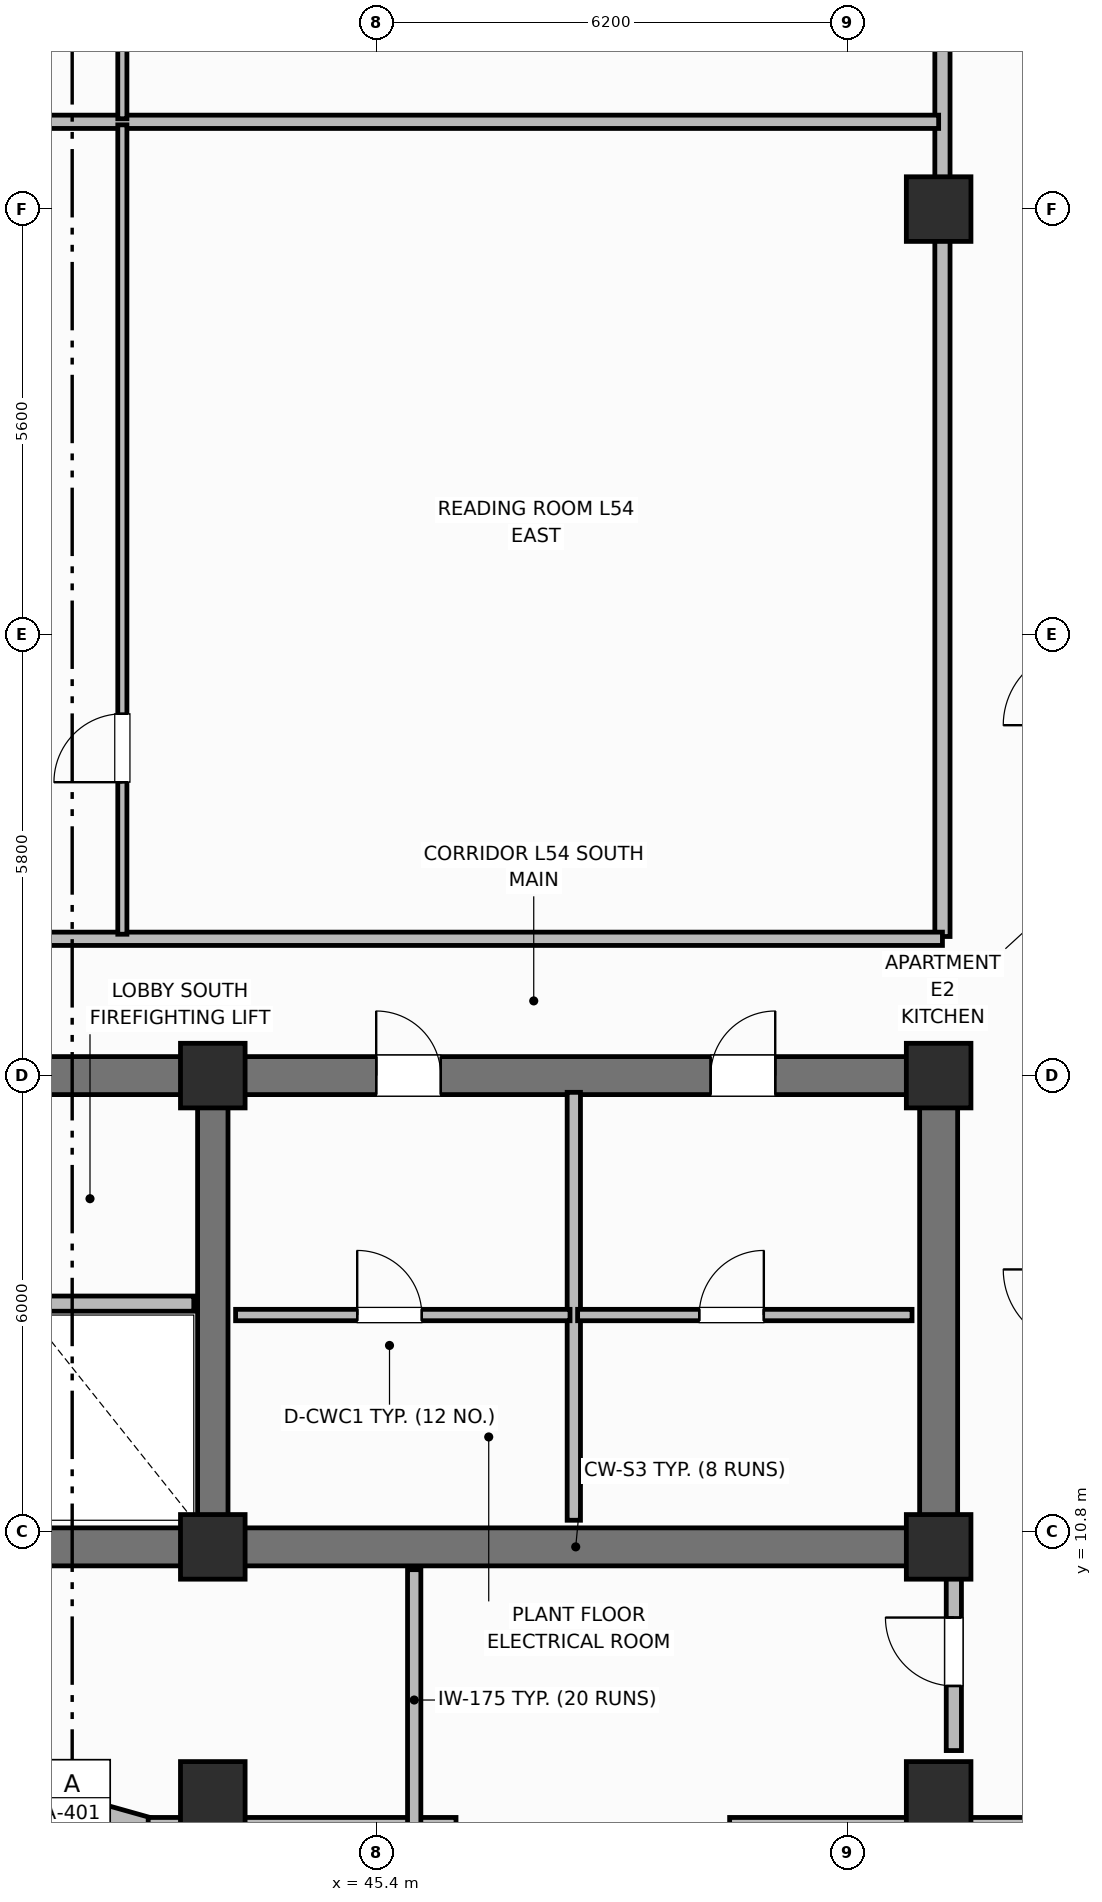
"""IFC4 building model, lengths in metres.
Left out: names, types, materials, properties, quantities, classifications, styles, units other than length and angle.
Written with IfcOpenShell. Run it as: python <this file> out.ifc"""

import sys

from ifc_helpers import new_model, si_unit, direction, frame, frame_2d, origin, origin_2d, place, context, subcontext, project, spatial, rectangle, extrude, element, fill, save


model = new_model("IFC4")
c1 = context("Model", 3, precision=1e-05, world=origin(), true_north=direction((0.0, 1.0)))
c2 = subcontext(c1, "Body", "Model", "MODEL_VIEW")
j1 = project(units=[si_unit("LENGTHUNIT", "METRE"), si_unit("PLANEANGLEUNIT", "RADIAN")], contexts=[c1])
p1 = place(None, origin())
s1 = spatial("IfcSite", under=j1, at=p1, CompositionType="ELEMENT")
p2 = place(p1, origin())
s2 = spatial("IfcBuilding", under=s1, at=p2, CompositionType="ELEMENT")
p3 = place(p2, frame((0.0, 0.0, 218.4)))
s3 = spatial("IfcBuildingStorey", under=s2, at=p3, CompositionType="ELEMENT", Elevation=218.4)
p4 = place(p3, frame((52.8, 10.6, 0.0), z_axis=(0.0, 0.0, 1.0), x_axis=(-1.0, 0.0, 0.0)))
e1 = element("IfcWall", 1, at=p4, inside=s3, PredefinedType="SHEAR", context=c2, shape_type="SweptSolid", body=[
    extrude(rectangle(XDim=27.2, YDim=0.5, at=frame_2d((13.6, 0.0))), origin(), (0.0, 0.0, 1.0), 3.7),
])
p5 = place(p3, frame((52.8, 10.85, 0.0), z_axis=(0.0, 0.0, 1.0), x_axis=(0.0, 1.0, 0.0)))
e2 = element("IfcWall", 2, at=p5, inside=s3, PredefinedType="SHEAR", context=c2, shape_type="SweptSolid", body=[
    extrude(rectangle(XDim=5.7, YDim=0.5, at=frame_2d((2.85, 0.0))), origin(), (0.0, 0.0, 1.0), 3.7),
])
p6 = place(p3, frame((25.6, 16.8, 0.0), z_axis=(0.0, 0.0, 1.0), x_axis=(1.0, 0.0, 0.0)))
e3 = element("IfcWall", 3, at=p6, inside=s3, PredefinedType="SHEAR", context=c2, shape_type="SweptSolid", body=[
    extrude(rectangle(XDim=27.2, YDim=0.5, at=frame_2d((13.6, 0.0))), origin(), (0.0, 0.0, 1.0), 3.7),
])
p7 = place(p6, frame((1.7, 0.0, 0.0)))
e4 = element("IfcOpeningElement", 4, at=p7, cuts=e3, PredefinedType="OPENING", context=c2, shape_type="SweptSolid", body=[
    extrude(rectangle(XDim=1.1, YDim=2.15, at=frame_2d((0.55, 1.075))), frame((0.0, 0.26, 0.0), z_axis=(0.0, -1.0, 0.0), x_axis=(1.0, 0.0, 0.0)), (0.0, 0.0, 1.0), 0.52),
])
p8 = place(p6, frame((4.45, 0.0, 0.0)))
e5 = element("IfcOpeningElement", 5, at=p8, cuts=e3, PredefinedType="OPENING", context=c2, shape_type="SweptSolid", body=[
    extrude(rectangle(XDim=0.85, YDim=2.1, at=frame_2d((0.425, 1.05))), frame((0.0, 0.26, 0.0), z_axis=(0.0, -1.0, 0.0), x_axis=(1.0, 0.0, 0.0)), (0.0, 0.0, 1.0), 0.52),
])
p9 = place(p6, frame((6.5, 0.0, 0.0)))
e6 = element("IfcOpeningElement", 6, at=p9, cuts=e3, PredefinedType="OPENING", context=c2, shape_type="SweptSolid", body=[
    extrude(rectangle(XDim=0.85, YDim=2.1, at=frame_2d((0.425, 1.05))), frame((0.0, 0.26, 0.0), z_axis=(0.0, -1.0, 0.0), x_axis=(1.0, 0.0, 0.0)), (0.0, 0.0, 1.0), 0.52),
])
p10 = place(p6, frame((13.0, 0.0, 0.0)))
e7 = element("IfcOpeningElement", 7, at=p10, cuts=e3, PredefinedType="OPENING", context=c2, shape_type="SweptSolid", body=[
    extrude(rectangle(XDim=1.2, YDim=2.15, at=frame_2d((0.6, 1.075))), frame((0.0, 0.26, 0.0), z_axis=(0.0, -1.0, 0.0), x_axis=(1.0, 0.0, 0.0)), (0.0, 0.0, 1.0), 0.52),
])
p11 = place(p6, frame((19.8, 0.0, 0.0)))
e8 = element("IfcOpeningElement", 8, at=p11, cuts=e3, PredefinedType="OPENING", context=c2, shape_type="SweptSolid", body=[
    extrude(rectangle(XDim=0.85, YDim=2.1, at=frame_2d((0.425, 1.05))), frame((0.0, 0.26, 0.0), z_axis=(0.0, -1.0, 0.0), x_axis=(1.0, 0.0, 0.0)), (0.0, 0.0, 1.0), 0.52),
])
p12 = place(p6, frame((24.2, 0.0, 0.0)))
e9 = element("IfcOpeningElement", 9, at=p12, cuts=e3, PredefinedType="OPENING", context=c2, shape_type="SweptSolid", body=[
    extrude(rectangle(XDim=0.85, YDim=2.1, at=frame_2d((0.425, 1.05))), frame((0.0, 0.26, 0.0), z_axis=(0.0, -1.0, 0.0), x_axis=(1.0, 0.0, 0.0)), (0.0, 0.0, 1.0), 0.52),
])
p13 = place(p3, frame((43.25, 10.85, 0.0), z_axis=(0.0, 0.0, 1.0), x_axis=(0.0, 1.0, 0.0)))
e10 = element("IfcWall", 10, at=p13, inside=s3, PredefinedType="SHEAR", context=c2, shape_type="SweptSolid", body=[
    extrude(rectangle(XDim=5.7, YDim=0.4, at=frame_2d((2.85, 0.0))), origin(), (0.0, 0.0, 1.0), 3.7),
])
for number, where, z_axis, x_axis in (
    (11, (43.25, 10.6, 0.0), (0.0, 0.0, 1.0), (1.0, 0.0, 0.0)),
    (12, (43.25, 16.8, 0.0), (0.0, 0.0, 1.0), (1.0, 0.0, 0.0)),
    (13, (52.8, 10.6, 0.0), (0.0, 0.0, 1.0), (1.0, 0.0, 0.0)),
    (14, (52.8, 16.8, 0.0), (0.0, 0.0, 1.0), (1.0, 0.0, 0.0)),
    (15, (52.8, 28.2, 0.0), (0.0, 0.0, 1.0), (1.0, 0.0, 0.0)),
    (16, (43.25, 7.35, 0.0), (0.0, 0.0, 1.0), (1.0, 0.0, 0.0)),
    (17, (52.8, 7.35, 0.0), (0.0, 0.0, 1.0), (1.0, 0.0, 0.0)),
):
    element("IfcColumn", number, at=place(p3, frame(where, z_axis=z_axis, x_axis=x_axis)), inside=s3, PredefinedType="COLUMN", context=c2, shape_type="SweptSolid", body=[
        extrude(rectangle(XDim=0.85, YDim=0.85, at=origin_2d()), origin(), (0.0, 0.0, 1.0), 3.7),
    ])
p14 = place(p3, frame((40.8, 7.32, 0.0), z_axis=(0.0, 0.0, 1.0), x_axis=(0.962652136636, -0.270741322725, 0.0)))
e18 = element("IfcWall", 18, at=p14, inside=s3, PredefinedType="SOLIDWALL", context=c2, shape_type="SweptSolid", body=[
    extrude(rectangle(XDim=1.662, YDim=0.34, at=frame_2d((0.831, 0.0))), origin(), (0.0, 0.0, 1.0), 2.72),
])
p15 = place(p3, frame((42.4, 6.87, 0.0), z_axis=(0.0, 0.0, 1.0), x_axis=(1.0, 0.0, 0.0)))
e19 = element("IfcWall", 19, at=p15, inside=s3, PredefinedType="SOLIDWALL", context=c2, shape_type="SweptSolid", body=[
    extrude(rectangle(XDim=4.05, YDim=0.34, at=frame_2d((2.025, 0.0))), origin(), (0.0, 0.0, 1.0), 2.72),
])
p16 = place(p3, frame((50.05, 6.87, 0.0), z_axis=(0.0, 0.0, 1.0), x_axis=(1.0, 0.0, 0.0)))
e20 = element("IfcWall", 20, at=p16, inside=s3, PredefinedType="SOLIDWALL", context=c2, shape_type="SweptSolid", body=[
    extrude(rectangle(XDim=8.15, YDim=0.34, at=frame_2d((4.075, 0.0))), origin(), (0.0, 0.0, 1.0), 2.72),
])
p17 = place(p3, frame((35.4, 13.8, 0.0), z_axis=(0.0, 0.0, 1.0), x_axis=(1.0, 0.0, 0.0)))
e21 = element("IfcWall", 21, at=p17, inside=s3, PredefinedType="PARTITIONING", context=c2, shape_type="SweptSolid", body=[
    extrude(rectangle(XDim=7.6, YDim=0.2, at=frame_2d((3.8, 0.0))), origin(), (0.0, 0.0, 1.0), 2.32),
])
p18 = place(p17, frame((0.7, 0.0, 0.0)))
e22 = element("IfcOpeningElement", 22, at=p18, cuts=e21, PredefinedType="OPENING", context=c2, shape_type="SweptSolid", body=[
    extrude(rectangle(XDim=1.1, YDim=2.15, at=frame_2d((0.55, 1.075))), frame((0.0, 0.11, 0.0), z_axis=(0.0, -1.0, 0.0), x_axis=(1.0, 0.0, 0.0)), (0.0, 0.0, 1.0), 0.22),
])
p19 = place(p17, frame((3.35, 0.0, 0.0)))
e23 = element("IfcOpeningElement", 23, at=p19, cuts=e21, PredefinedType="OPENING", context=c2, shape_type="SweptSolid", body=[
    extrude(rectangle(XDim=1.2, YDim=2.15, at=frame_2d((0.6, 1.075))), frame((0.0, 0.11, 0.0), z_axis=(0.0, -1.0, 0.0), x_axis=(1.0, 0.0, 0.0)), (0.0, 0.0, 1.0), 0.22),
])
p20 = place(p3, frame((48.0, 10.95, 0.0), z_axis=(0.0, 0.0, 1.0), x_axis=(0.0, 1.0, 0.0)))
e24 = element("IfcWall", 24, at=p20, inside=s3, PredefinedType="PARTITIONING", context=c2, shape_type="SweptSolid", body=[
    extrude(rectangle(XDim=5.63, YDim=0.175, at=frame_2d((2.815, 0.0))), origin(), (0.0, 0.0, 1.0), 2.55),
])
p21 = place(p3, frame((43.55, 13.65, 0.0), z_axis=(0.0, 0.0, 1.0), x_axis=(1.0, 0.0, 0.0)))
e25 = element("IfcWall", 25, at=p21, inside=s3, PredefinedType="PARTITIONING", context=c2, shape_type="SweptSolid", body=[
    extrude(rectangle(XDim=4.4, YDim=0.15, at=frame_2d((2.2, 0.0))), origin(), (0.0, 0.0, 1.0), 2.55),
])
p22 = place(p21, frame((1.6, 0.0, 0.0)))
e26 = element("IfcOpeningElement", 26, at=p22, cuts=e25, PredefinedType="OPENING", context=c2, shape_type="SweptSolid", body=[
    extrude(rectangle(XDim=0.85, YDim=2.1, at=frame_2d((0.425, 1.05))), frame((0.0, 0.085, 0.0), z_axis=(0.0, -1.0, 0.0), x_axis=(1.0, 0.0, 0.0)), (0.0, 0.0, 1.0), 0.17),
])
p23 = place(p3, frame((48.05, 13.65, 0.0), z_axis=(0.0, 0.0, 1.0), x_axis=(1.0, 0.0, 0.0)))
e27 = element("IfcWall", 27, at=p23, inside=s3, PredefinedType="PARTITIONING", context=c2, shape_type="SweptSolid", body=[
    extrude(rectangle(XDim=4.4, YDim=0.15, at=frame_2d((2.2, 0.0))), origin(), (0.0, 0.0, 1.0), 2.55),
])
p24 = place(p23, frame((1.6, 0.0, 0.0)))
e28 = element("IfcOpeningElement", 28, at=p24, cuts=e27, PredefinedType="OPENING", context=c2, shape_type="SweptSolid", body=[
    extrude(rectangle(XDim=0.85, YDim=2.1, at=frame_2d((0.425, 1.05))), frame((0.0, 0.085, 0.0), z_axis=(0.0, -1.0, 0.0), x_axis=(1.0, 0.0, 0.0)), (0.0, 0.0, 1.0), 0.17),
])
p25 = place(p3, frame((52.85, 18.63, 0.0), z_axis=(0.0, 0.0, 1.0), x_axis=(0.0, 1.0, 0.0)))
e29 = element("IfcWall", 29, at=p25, inside=s3, PredefinedType="PARTITIONING", context=c2, shape_type="SweptSolid", body=[
    extrude(rectangle(XDim=19.14, YDim=0.2, at=frame_2d((9.57, 0.0))), origin(), (0.0, 0.0, 1.0), 2.55),
])
p26 = place(p3, frame((31.35, 18.6, 0.0), z_axis=(0.0, 0.0, 1.0), x_axis=(1.0, 0.0, 0.0)))
e30 = element("IfcWall", 30, at=p26, inside=s3, PredefinedType="PARTITIONING", context=c2, shape_type="SweptSolid", body=[
    extrude(rectangle(XDim=21.5, YDim=0.175, at=frame_2d((10.75, 0.0))), origin(), (0.0, 0.0, 1.0), 2.55),
])
p27 = place(p3, frame((31.38, 29.348, 0.0), z_axis=(0.0, 0.0, 1.0), x_axis=(1.0, 0.0, 0.0)))
e31 = element("IfcWall", 31, at=p27, inside=s3, PredefinedType="PARTITIONING", context=c2, shape_type="SweptSolid", body=[
    extrude(rectangle(XDim=21.42, YDim=0.175, at=frame_2d((10.71, 0.0))), origin(), (0.0, 0.0, 1.0), 2.55),
])
p28 = place(p3, frame((42.06, 18.66, 0.0), z_axis=(0.0, 0.0, 1.0), x_axis=(0.0, 1.0, 0.0)))
e32 = element("IfcWall", 32, at=p28, inside=s3, PredefinedType="PARTITIONING", context=c2, shape_type="SweptSolid", body=[
    extrude(rectangle(XDim=10.648, YDim=0.12, at=frame_2d((5.324, 0.0))), origin(), (0.0, 0.0, 1.0), 2.55),
])
p29 = place(p28, frame((2.0, 0.0, 0.0)))
e33 = element("IfcOpeningElement", 33, at=p29, cuts=e32, PredefinedType="OPENING", context=c2, shape_type="SweptSolid", body=[
    extrude(rectangle(XDim=0.9, YDim=2.1, at=frame_2d((0.45, 1.05))), frame((0.0, 0.07, 0.0), z_axis=(0.0, -1.0, 0.0), x_axis=(1.0, 0.0, 0.0)), (0.0, 0.0, 1.0), 0.14),
])
p30 = place(p3, frame((42.06, 29.388, 0.0), z_axis=(0.0, 0.0, 1.0), x_axis=(0.0, 1.0, 0.0)))
e34 = element("IfcWall", 34, at=p30, inside=s3, PredefinedType="PARTITIONING", context=c2, shape_type="SweptSolid", body=[
    extrude(rectangle(XDim=8.352, YDim=0.12, at=frame_2d((4.176, 0.0))), origin(), (0.0, 0.0, 1.0), 2.55),
])
p31 = place(p30, frame((2.0, 0.0, 0.0)))
e35 = element("IfcOpeningElement", 35, at=p31, cuts=e34, PredefinedType="OPENING", context=c2, shape_type="SweptSolid", body=[
    extrude(rectangle(XDim=0.9, YDim=2.1, at=frame_2d((0.45, 1.05))), frame((0.0, 0.07, 0.0), z_axis=(0.0, -1.0, 0.0), x_axis=(1.0, 0.0, 0.0)), (0.0, 0.0, 1.0), 0.14),
])
p32 = place(p3, frame((45.9, 6.87, 0.0), z_axis=(0.0, 0.0, 1.0), x_axis=(0.0, 1.0, 0.0)))
e36 = element("IfcWall", 36, at=p32, inside=s3, PredefinedType="PARTITIONING", context=c2, shape_type="SweptSolid", body=[
    extrude(rectangle(XDim=3.43, YDim=0.175, at=frame_2d((1.715, 0.0))), origin(), (0.0, 0.0, 1.0), 2.55),
])
p33 = place(p3, frame((53.0, 7.92, 0.0), z_axis=(0.0, 0.0, 1.0), x_axis=(0.0, 1.0, 0.0)))
e37 = element("IfcWall", 37, at=p33, inside=s3, PredefinedType="PARTITIONING", context=c2, shape_type="SweptSolid", body=[
    extrude(rectangle(XDim=2.38, YDim=0.2, at=frame_2d((1.19, 0.0))), origin(), (0.0, 0.0, 1.0), 2.55),
])
p34 = place(p33, frame((0.85, 0.0, 0.0)))
e38 = element("IfcOpeningElement", 38, at=p34, cuts=e37, PredefinedType="OPENING", context=c2, shape_type="SweptSolid", body=[
    extrude(rectangle(XDim=0.9, YDim=2.1, at=frame_2d((0.45, 1.05))), frame((0.0, 0.11, 0.0), z_axis=(0.0, -1.0, 0.0), x_axis=(1.0, 0.0, 0.0)), (0.0, 0.0, 1.0), 0.22),
])
p35 = place(p22, origin())
e39 = element("IfcDoor", 39, at=p35, inside=s3, OperationType="SINGLE_SWING_LEFT", PredefinedType="DOOR", context=c2, shape_type="SweptSolid", body=[
    extrude(rectangle(XDim=0.85, YDim=2.1, at=frame_2d((0.425, 1.05))), frame((0.0, 0.025, 0.0), z_axis=(0.0, -1.0, 0.0), x_axis=(1.0, 0.0, 0.0)), (0.0, 0.0, 1.0), 0.05),
])
fill(e26, e39)
p36 = place(p24, origin())
e40 = element("IfcDoor", 40, at=p36, inside=s3, OperationType="SINGLE_SWING_RIGHT", PredefinedType="DOOR", context=c2, shape_type="SweptSolid", body=[
    extrude(rectangle(XDim=0.85, YDim=2.1, at=frame_2d((0.425, 1.05))), frame((0.0, 0.025, 0.0), z_axis=(0.0, -1.0, 0.0), x_axis=(1.0, 0.0, 0.0)), (0.0, 0.0, 1.0), 0.05),
])
fill(e28, e40)
p37 = place(p29, origin())
e41 = element("IfcDoor", 41, at=p37, inside=s3, OperationType="SINGLE_SWING_LEFT", PredefinedType="DOOR", context=c2, shape_type="SweptSolid", body=[
    extrude(rectangle(XDim=0.9, YDim=2.1, at=frame_2d((0.45, 1.05))), frame((0.0, 0.025, 0.0), z_axis=(0.0, -1.0, 0.0), x_axis=(1.0, 0.0, 0.0)), (0.0, 0.0, 1.0), 0.05),
])
fill(e33, e41)
p38 = place(p34, origin())
e42 = element("IfcDoor", 42, at=p38, inside=s3, OperationType="SINGLE_SWING_RIGHT", PredefinedType="DOOR", context=c2, shape_type="SweptSolid", body=[
    extrude(rectangle(XDim=0.9, YDim=2.1, at=frame_2d((0.45, 1.05))), frame((0.0, 0.025, 0.0), z_axis=(0.0, -1.0, 0.0), x_axis=(1.0, 0.0, 0.0)), (0.0, 0.0, 1.0), 0.05),
])
fill(e38, e42)
p39 = place(p11, origin())
e43 = element("IfcDoor", 43, at=p39, inside=s3, OperationType="SINGLE_SWING_LEFT", PredefinedType="DOOR", context=c2, shape_type="SweptSolid", body=[
    extrude(rectangle(XDim=0.85, YDim=2.1, at=frame_2d((0.425, 1.05))), frame((0.0, 0.025, 0.0), z_axis=(0.0, -1.0, 0.0), x_axis=(1.0, 0.0, 0.0)), (0.0, 0.0, 1.0), 0.05),
])
fill(e8, e43)
p40 = place(p12, origin())
e44 = element("IfcDoor", 44, at=p40, inside=s3, OperationType="SINGLE_SWING_RIGHT", PredefinedType="DOOR", context=c2, shape_type="SweptSolid", body=[
    extrude(rectangle(XDim=0.85, YDim=2.1, at=frame_2d((0.425, 1.05))), frame((0.0, 0.025, 0.0), z_axis=(0.0, -1.0, 0.0), x_axis=(1.0, 0.0, 0.0)), (0.0, 0.0, 1.0), 0.05),
])
fill(e9, e44)
save(model, sys.argv[1])
